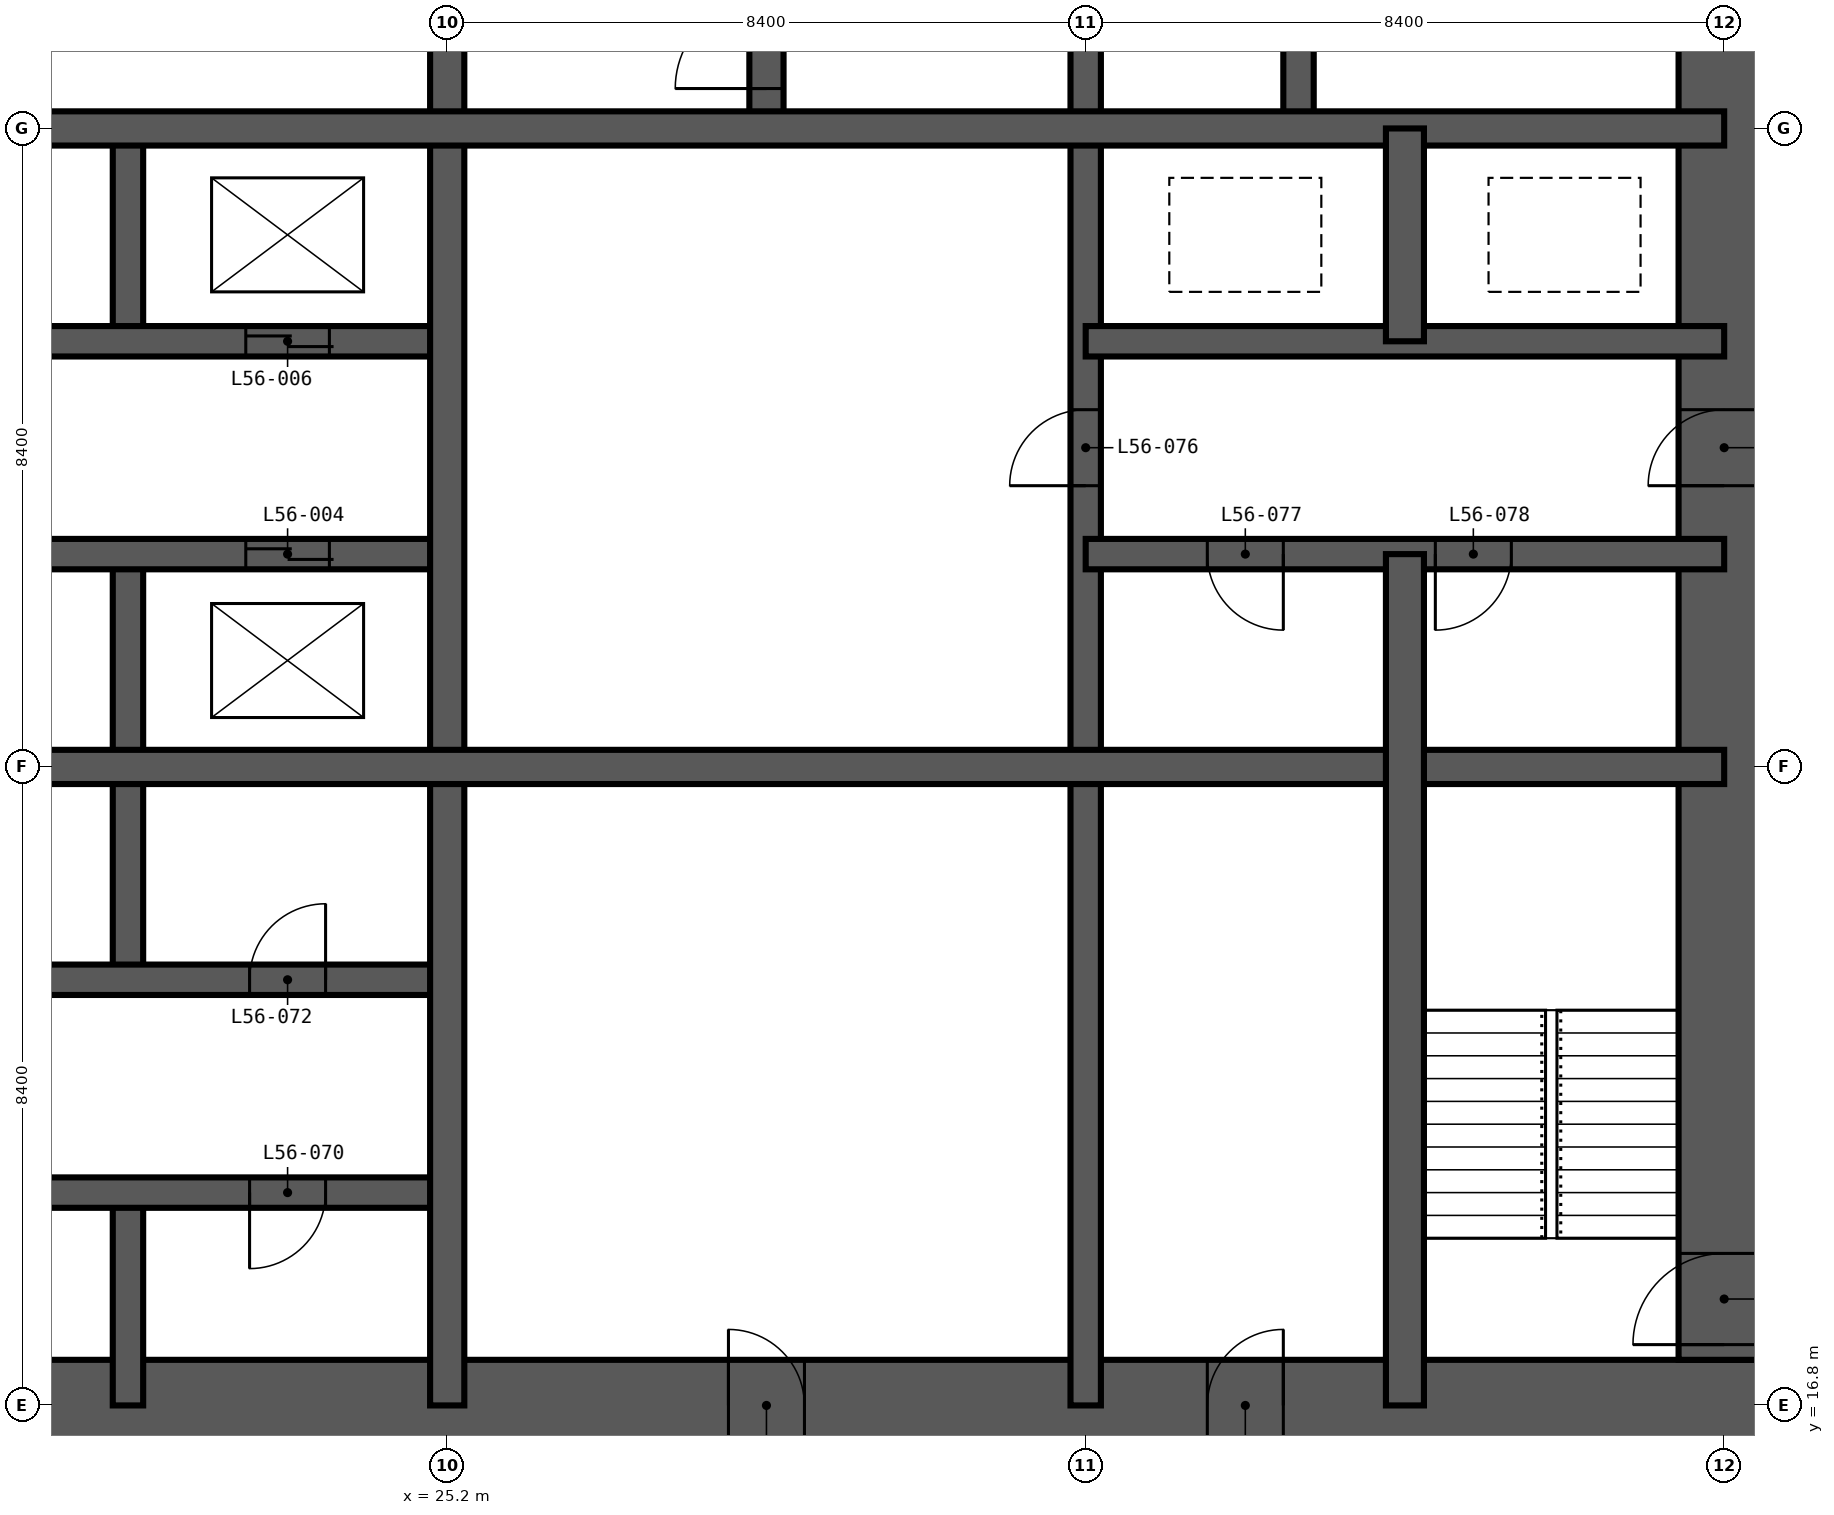
"""IFC4 building model, lengths in metres.
Left out: names, types, materials, properties, quantities, classifications, styles, units other than length and angle.
Written with IfcOpenShell. Run it as: python <this file> out.ifc"""

import sys

from ifc_helpers import new_model, si_unit, direction, frame, frame_2d, origin, place, context, subcontext, project, spatial, rectangle, extrude, element, fill, save


model = new_model("IFC4")
c1 = context("Model", 3, precision=1e-05, world=origin(), true_north=direction((0.0, 1.0)))
c2 = subcontext(c1, "Body", "Model", "MODEL_VIEW")
j1 = project(units=[si_unit("LENGTHUNIT", "METRE"), si_unit("PLANEANGLEUNIT", "RADIAN")], contexts=[c1])
p1 = place(None, origin())
s1 = spatial("IfcSite", under=j1, at=p1, CompositionType="ELEMENT")
p2 = place(p1, origin())
s2 = spatial("IfcBuilding", under=s1, at=p2, CompositionType="ELEMENT")
p3 = place(p2, frame((0.0, 0.0, 216.6)))
s3 = spatial("IfcBuildingStorey", under=s2, at=p3, CompositionType="ELEMENT", Elevation=216.6)
p4 = place(p3, frame((16.2, 16.8, -0.35), z_axis=(0.0, 0.0, 1.0), x_axis=(1.0, 0.0, 0.0)))
e1 = element("IfcWall", 1, at=p4, inside=s3, PredefinedType="SHEAR", context=c2, shape_type="SweptSolid", body=[
    extrude(rectangle(XDim=26.4, YDim=1.2, at=frame_2d((13.2, 0.0))), origin(), (0.0, 0.0, 1.0), 3.55),
])
p5 = place(p4, frame((12.7, 0.0, 0.35)))
e2 = element("IfcOpeningElement", 2, at=p5, cuts=e1, PredefinedType="OPENING", context=c2, shape_type="SweptSolid", body=[
    extrude(rectangle(XDim=1.0, YDim=2.1, at=frame_2d((0.5, 1.05))), frame((0.0, 0.61, 0.0), z_axis=(0.0, -1.0, 0.0), x_axis=(1.0, 0.0, 0.0)), (0.0, 0.0, 1.0), 1.22),
])
p6 = place(p4, frame((19.0, 0.0, 0.35)))
e3 = element("IfcOpeningElement", 3, at=p6, cuts=e1, PredefinedType="OPENING", context=c2, shape_type="SweptSolid", body=[
    extrude(rectangle(XDim=1.0, YDim=2.1, at=frame_2d((0.5, 1.05))), frame((0.0, 0.61, 0.0), z_axis=(0.0, -1.0, 0.0), x_axis=(1.0, 0.0, 0.0)), (0.0, 0.0, 1.0), 1.22),
])
p7 = place(p3, frame((42.0, 17.4, -0.35), z_axis=(0.0, 0.0, 1.0), x_axis=(0.0, 1.0, 0.0)))
e4 = element("IfcWall", 4, at=p7, inside=s3, PredefinedType="SHEAR", context=c2, shape_type="SweptSolid", body=[
    extrude(rectangle(XDim=24.0, YDim=1.2, at=frame_2d((12.0, 0.0))), origin(), (0.0, 0.0, 1.0), 3.55),
])
p8 = place(p7, frame((0.2, 0.0, 0.35)))
e5 = element("IfcOpeningElement", 5, at=p8, cuts=e4, PredefinedType="OPENING", context=c2, shape_type="SweptSolid", body=[
    extrude(rectangle(XDim=1.2, YDim=2.2, at=frame_2d((0.6, 1.1))), frame((0.0, 0.61, 0.0), z_axis=(0.0, -1.0, 0.0), x_axis=(1.0, 0.0, 0.0)), (0.0, 0.0, 1.0), 1.22),
])
p9 = place(p7, frame((11.5, 0.0, 0.35)))
e6 = element("IfcOpeningElement", 6, at=p9, cuts=e4, PredefinedType="OPENING", context=c2, shape_type="SweptSolid", body=[
    extrude(rectangle(XDim=1.0, YDim=2.1, at=frame_2d((0.5, 1.05))), frame((0.0, 0.61, 0.0), z_axis=(0.0, -1.0, 0.0), x_axis=(1.0, 0.0, 0.0)), (0.0, 0.0, 1.0), 1.22),
])
p10 = place(p7, frame((19.9, 0.0, 0.35)))
e7 = element("IfcOpeningElement", 7, at=p10, cuts=e4, PredefinedType="OPENING", context=c2, shape_type="SweptSolid", body=[
    extrude(rectangle(XDim=1.0, YDim=2.1, at=frame_2d((0.5, 1.05))), frame((0.0, 0.61, 0.0), z_axis=(0.0, -1.0, 0.0), x_axis=(1.0, 0.0, 0.0)), (0.0, 0.0, 1.0), 1.22),
])
p11 = place(p3, frame((21.0, 16.8, -0.35), z_axis=(0.0, 0.0, 1.0), x_axis=(0.0, 1.0, 0.0)))
e8 = element("IfcWall", 8, at=p11, inside=s3, PredefinedType="SHEAR", context=c2, shape_type="SweptSolid", body=[
    extrude(rectangle(XDim=2.8, YDim=0.4, at=frame_2d((1.4, 0.0))), origin(), (0.0, 0.0, 1.0), 3.55),
])
p12 = place(p3, frame((21.0, 22.4, -0.35), z_axis=(0.0, 0.0, 1.0), x_axis=(0.0, 1.0, 0.0)))
e9 = element("IfcWall", 9, at=p12, inside=s3, PredefinedType="SHEAR", context=c2, shape_type="SweptSolid", body=[
    extrude(rectangle(XDim=5.6, YDim=0.4, at=frame_2d((2.8, 0.0))), origin(), (0.0, 0.0, 1.0), 3.55),
])
p13 = place(p3, frame((21.0, 30.8, -0.35), z_axis=(0.0, 0.0, 1.0), x_axis=(0.0, 1.0, 0.0)))
e10 = element("IfcWall", 10, at=p13, inside=s3, PredefinedType="SHEAR", context=c2, shape_type="SweptSolid", body=[
    extrude(rectangle(XDim=2.8, YDim=0.4, at=frame_2d((1.4, 0.0))), origin(), (0.0, 0.0, 1.0), 3.55),
])
p14 = place(p3, frame((33.6, 16.8, -0.35), z_axis=(0.0, 0.0, 1.0), x_axis=(0.0, 1.0, 0.0)))
e11 = element("IfcWall", 11, at=p14, inside=s3, PredefinedType="SHEAR", context=c2, shape_type="SweptSolid", body=[
    extrude(rectangle(XDim=25.2, YDim=0.4, at=frame_2d((12.6, 0.0))), origin(), (0.0, 0.0, 1.0), 3.55),
])
p15 = place(p14, frame((22.5, 0.0, 0.35)))
e12 = element("IfcOpeningElement", 12, at=p15, cuts=e11, PredefinedType="OPENING", context=c2, shape_type="SweptSolid", body=[
    extrude(rectangle(XDim=1.2, YDim=2.2, at=frame_2d((0.6, 1.1))), frame((0.0, 0.21, 0.0), z_axis=(0.0, -1.0, 0.0), x_axis=(1.0, 0.0, 0.0)), (0.0, 0.0, 1.0), 0.42),
])
p16 = place(p14, frame((18.3, 0.0, 0.35)))
e13 = element("IfcOpeningElement", 13, at=p16, cuts=e11, PredefinedType="OPENING", context=c2, shape_type="SweptSolid", body=[
    extrude(rectangle(XDim=1.2, YDim=2.2, at=frame_2d((0.6, 1.1))), frame((0.0, 0.21, 0.0), z_axis=(0.0, -1.0, 0.0), x_axis=(1.0, 0.0, 0.0)), (0.0, 0.0, 1.0), 0.42),
])
p17 = place(p14, frame((12.1, 0.0, 0.35)))
e14 = element("IfcOpeningElement", 14, at=p17, cuts=e11, PredefinedType="OPENING", context=c2, shape_type="SweptSolid", body=[
    extrude(rectangle(XDim=1.0, YDim=2.1, at=frame_2d((0.5, 1.05))), frame((0.0, 0.21, 0.0), z_axis=(0.0, -1.0, 0.0), x_axis=(1.0, 0.0, 0.0)), (0.0, 0.0, 1.0), 0.42),
])
p18 = place(p3, frame((36.4, 33.6, -0.35), z_axis=(0.0, 0.0, 1.0), x_axis=(0.0, 1.0, 0.0)))
e15 = element("IfcWall", 15, at=p18, inside=s3, PredefinedType="SHEAR", context=c2, shape_type="SweptSolid", body=[
    extrude(rectangle(XDim=8.4, YDim=0.4, at=frame_2d((4.2, 0.0))), origin(), (0.0, 0.0, 1.0), 3.55),
])
p19 = place(p3, frame((16.8, 19.6, -0.35), z_axis=(0.0, 0.0, 1.0), x_axis=(1.0, 0.0, 0.0)))
e16 = element("IfcWall", 16, at=p19, inside=s3, PredefinedType="SHEAR", context=c2, shape_type="SweptSolid", body=[
    extrude(rectangle(XDim=8.4, YDim=0.4, at=frame_2d((4.2, 0.0))), origin(), (0.0, 0.0, 1.0), 3.55),
])
p20 = place(p19, frame((1.6, 0.0, 0.35)))
e17 = element("IfcOpeningElement", 17, at=p20, cuts=e16, PredefinedType="OPENING", context=c2, shape_type="SweptSolid", body=[
    extrude(rectangle(XDim=1.0, YDim=2.1, at=frame_2d((0.5, 1.05))), frame((0.0, 0.21, 0.0), z_axis=(0.0, -1.0, 0.0), x_axis=(1.0, 0.0, 0.0)), (0.0, 0.0, 1.0), 0.42),
])
p21 = place(p19, frame((5.8, 0.0, 0.35)))
e18 = element("IfcOpeningElement", 18, at=p21, cuts=e16, PredefinedType="OPENING", context=c2, shape_type="SweptSolid", body=[
    extrude(rectangle(XDim=1.0, YDim=2.1, at=frame_2d((0.5, 1.05))), frame((0.0, 0.21, 0.0), z_axis=(0.0, -1.0, 0.0), x_axis=(1.0, 0.0, 0.0)), (0.0, 0.0, 1.0), 0.42),
])
p22 = place(p3, frame((16.8, 22.4, -0.35), z_axis=(0.0, 0.0, 1.0), x_axis=(1.0, 0.0, 0.0)))
e19 = element("IfcWall", 19, at=p22, inside=s3, PredefinedType="SHEAR", context=c2, shape_type="SweptSolid", body=[
    extrude(rectangle(XDim=8.4, YDim=0.4, at=frame_2d((4.2, 0.0))), origin(), (0.0, 0.0, 1.0), 3.55),
])
p23 = place(p22, frame((1.6, 0.0, 0.35)))
e20 = element("IfcOpeningElement", 20, at=p23, cuts=e19, PredefinedType="OPENING", context=c2, shape_type="SweptSolid", body=[
    extrude(rectangle(XDim=1.0, YDim=2.1, at=frame_2d((0.5, 1.05))), frame((0.0, 0.21, 0.0), z_axis=(0.0, -1.0, 0.0), x_axis=(1.0, 0.0, 0.0)), (0.0, 0.0, 1.0), 0.42),
])
p24 = place(p22, frame((5.8, 0.0, 0.35)))
e21 = element("IfcOpeningElement", 21, at=p24, cuts=e19, PredefinedType="OPENING", context=c2, shape_type="SweptSolid", body=[
    extrude(rectangle(XDim=1.0, YDim=2.1, at=frame_2d((0.5, 1.05))), frame((0.0, 0.21, 0.0), z_axis=(0.0, -1.0, 0.0), x_axis=(1.0, 0.0, 0.0)), (0.0, 0.0, 1.0), 0.42),
])
p25 = place(p3, frame((16.8, 28.0, -0.35), z_axis=(0.0, 0.0, 1.0), x_axis=(1.0, 0.0, 0.0)))
e22 = element("IfcWall", 22, at=p25, inside=s3, PredefinedType="SHEAR", context=c2, shape_type="SweptSolid", body=[
    extrude(rectangle(XDim=8.4, YDim=0.4, at=frame_2d((4.2, 0.0))), origin(), (0.0, 0.0, 1.0), 3.55),
])
p26 = place(p25, frame((1.55, 0.0, 0.35)))
e23 = element("IfcOpeningElement", 23, at=p26, cuts=e22, PredefinedType="OPENING", context=c2, shape_type="SweptSolid", body=[
    extrude(rectangle(XDim=1.1, YDim=2.2, at=frame_2d((0.55, 1.1))), frame((0.0, 0.21, 0.0), z_axis=(0.0, -1.0, 0.0), x_axis=(1.0, 0.0, 0.0)), (0.0, 0.0, 1.0), 0.42),
])
p27 = place(p25, frame((5.75, 0.0, 0.35)))
e24 = element("IfcOpeningElement", 24, at=p27, cuts=e22, PredefinedType="OPENING", context=c2, shape_type="SweptSolid", body=[
    extrude(rectangle(XDim=1.1, YDim=2.2, at=frame_2d((0.55, 1.1))), frame((0.0, 0.21, 0.0), z_axis=(0.0, -1.0, 0.0), x_axis=(1.0, 0.0, 0.0)), (0.0, 0.0, 1.0), 0.42),
])
p28 = place(p3, frame((33.6, 28.0, -0.35), z_axis=(0.0, 0.0, 1.0), x_axis=(1.0, 0.0, 0.0)))
e25 = element("IfcWall", 25, at=p28, inside=s3, PredefinedType="SHEAR", context=c2, shape_type="SweptSolid", body=[
    extrude(rectangle(XDim=8.4, YDim=0.4, at=frame_2d((4.2, 0.0))), origin(), (0.0, 0.0, 1.0), 3.55),
])
p29 = place(p28, frame((1.6, 0.0, 0.35)))
e26 = element("IfcOpeningElement", 26, at=p29, cuts=e25, PredefinedType="OPENING", context=c2, shape_type="SweptSolid", body=[
    extrude(rectangle(XDim=1.0, YDim=2.1, at=frame_2d((0.5, 1.05))), frame((0.0, 0.21, 0.0), z_axis=(0.0, -1.0, 0.0), x_axis=(1.0, 0.0, 0.0)), (0.0, 0.0, 1.0), 0.42),
])
p30 = place(p28, frame((4.6, 0.0, 0.35)))
e27 = element("IfcOpeningElement", 27, at=p30, cuts=e25, PredefinedType="OPENING", context=c2, shape_type="SweptSolid", body=[
    extrude(rectangle(XDim=1.0, YDim=2.1, at=frame_2d((0.5, 1.05))), frame((0.0, 0.21, 0.0), z_axis=(0.0, -1.0, 0.0), x_axis=(1.0, 0.0, 0.0)), (0.0, 0.0, 1.0), 0.42),
])
p31 = place(p3, frame((16.8, 30.8, -0.35), z_axis=(0.0, 0.0, 1.0), x_axis=(1.0, 0.0, 0.0)))
e28 = element("IfcWall", 28, at=p31, inside=s3, PredefinedType="SHEAR", context=c2, shape_type="SweptSolid", body=[
    extrude(rectangle(XDim=8.4, YDim=0.4, at=frame_2d((4.2, 0.0))), origin(), (0.0, 0.0, 1.0), 3.55),
])
p32 = place(p31, frame((1.55, 0.0, 0.35)))
e29 = element("IfcOpeningElement", 29, at=p32, cuts=e28, PredefinedType="OPENING", context=c2, shape_type="SweptSolid", body=[
    extrude(rectangle(XDim=1.1, YDim=2.2, at=frame_2d((0.55, 1.1))), frame((0.0, 0.21, 0.0), z_axis=(0.0, -1.0, 0.0), x_axis=(1.0, 0.0, 0.0)), (0.0, 0.0, 1.0), 0.42),
])
p33 = place(p31, frame((5.75, 0.0, 0.35)))
e30 = element("IfcOpeningElement", 30, at=p33, cuts=e28, PredefinedType="OPENING", context=c2, shape_type="SweptSolid", body=[
    extrude(rectangle(XDim=1.1, YDim=2.2, at=frame_2d((0.55, 1.1))), frame((0.0, 0.21, 0.0), z_axis=(0.0, -1.0, 0.0), x_axis=(1.0, 0.0, 0.0)), (0.0, 0.0, 1.0), 0.42),
])
p34 = place(p3, frame((33.6, 30.8, -0.35), z_axis=(0.0, 0.0, 1.0), x_axis=(1.0, 0.0, 0.0)))
e31 = element("IfcWall", 31, at=p34, inside=s3, PredefinedType="SHEAR", context=c2, shape_type="SweptSolid", body=[
    extrude(rectangle(XDim=8.4, YDim=0.4, at=frame_2d((4.2, 0.0))), origin(), (0.0, 0.0, 1.0), 3.55),
])
p35 = place(p3, frame((25.2, 16.8, -0.35), z_axis=(0.0, 0.0, 1.0), x_axis=(0.0, 1.0, 0.0)))
e32 = element("IfcWall", 32, at=p35, inside=s3, PredefinedType="SHEAR", context=c2, shape_type="SweptSolid", body=[
    extrude(rectangle(XDim=25.2, YDim=0.45, at=frame_2d((12.6, 0.0))), origin(), (0.0, 0.0, 1.0), 3.55),
])
p36 = place(p3, frame((29.4, 33.6, -0.35), z_axis=(0.0, 0.0, 1.0), x_axis=(0.0, 1.0, 0.0)))
e33 = element("IfcWall", 33, at=p36, inside=s3, PredefinedType="SHEAR", context=c2, shape_type="SweptSolid", body=[
    extrude(rectangle(XDim=8.4, YDim=0.45, at=frame_2d((4.2, 0.0))), origin(), (0.0, 0.0, 1.0), 3.55),
])
p37 = place(p36, frame((0.525, 0.0, 0.35)))
e34 = element("IfcOpeningElement", 34, at=p37, cuts=e33, PredefinedType="OPENING", context=c2, shape_type="SweptSolid", body=[
    extrude(rectangle(XDim=1.2, YDim=2.2, at=frame_2d((0.6, 1.1))), frame((0.0, 0.235, 0.0), z_axis=(0.0, -1.0, 0.0), x_axis=(1.0, 0.0, 0.0)), (0.0, 0.0, 1.0), 0.47),
])
for number, where, z_axis, x_axis in (
    (35, (16.8, 25.2, -0.35), (0.0, 0.0, 1.0), (1.0, 0.0, 0.0)),
    (36, (16.8, 33.6, -0.35), (0.0, 0.0, 1.0), (1.0, 0.0, 0.0)),
):
    element("IfcWall", number, at=place(p3, frame(where, z_axis=z_axis, x_axis=x_axis)), inside=s3, PredefinedType="SHEAR", context=c2, shape_type="SweptSolid", body=[
        extrude(rectangle(XDim=25.2, YDim=0.45, at=frame_2d((12.6, 0.0))), origin(), (0.0, 0.0, 1.0), 3.55),
    ])
p38 = place(p3, frame((37.8, 16.8, -0.35), z_axis=(0.0, 0.0, 1.0), x_axis=(0.0, 1.0, 0.0)))
e37 = element("IfcWall", 37, at=p38, inside=s3, PredefinedType="SHEAR", context=c2, shape_type="SweptSolid", body=[
    extrude(rectangle(XDim=11.2, YDim=0.5, at=frame_2d((5.6, 0.0))), origin(), (0.0, 0.0, 1.0), 3.55),
])
p39 = place(p3, frame((37.8, 30.8, -0.35), z_axis=(0.0, 0.0, 1.0), x_axis=(0.0, 1.0, 0.0)))
e38 = element("IfcWall", 38, at=p39, inside=s3, PredefinedType="SHEAR", context=c2, shape_type="SweptSolid", body=[
    extrude(rectangle(XDim=2.8, YDim=0.5, at=frame_2d((1.4, 0.0))), origin(), (0.0, 0.0, 1.0), 3.55),
])
p40 = place(p37, origin())
e39 = element("IfcDoor", 39, at=p40, inside=s3, OperationType="SINGLE_SWING_LEFT", PredefinedType="DOOR", context=c2, shape_type="SweptSolid", body=[
    extrude(rectangle(XDim=1.2, YDim=2.2, at=frame_2d((0.6, 1.1))), frame((0.0, 0.025, 0.0), z_axis=(0.0, -1.0, 0.0), x_axis=(1.0, 0.0, 0.0)), (0.0, 0.0, 1.0), 0.05),
])
fill(e34, e39)
p41 = place(p8, origin())
e40 = element("IfcDoor", 40, at=p41, inside=s3, OperationType="SINGLE_SWING_LEFT", PredefinedType="DOOR", context=c2, shape_type="SweptSolid", body=[
    extrude(rectangle(XDim=1.2, YDim=2.2, at=frame_2d((0.6, 1.1))), frame((0.0, 0.025, 0.0), z_axis=(0.0, -1.0, 0.0), x_axis=(1.0, 0.0, 0.0)), (0.0, 0.0, 1.0), 0.05),
])
fill(e5, e40)
p42 = place(p27, origin())
e41 = element("IfcDoor", 41, at=p42, inside=s3, OperationType="DOUBLE_DOOR_SLIDING", PredefinedType="DOOR", context=c2, shape_type="SweptSolid", body=[
    extrude(rectangle(XDim=1.1, YDim=2.2, at=frame_2d((0.55, 1.1))), frame((0.0, 0.025, 0.0), z_axis=(0.0, -1.0, 0.0), x_axis=(1.0, 0.0, 0.0)), (0.0, 0.0, 1.0), 0.05),
])
fill(e24, e41)
p43 = place(p33, origin())
e42 = element("IfcDoor", 42, at=p43, inside=s3, OperationType="DOUBLE_DOOR_SLIDING", PredefinedType="DOOR", context=c2, shape_type="SweptSolid", body=[
    extrude(rectangle(XDim=1.1, YDim=2.2, at=frame_2d((0.55, 1.1))), frame((0.0, 0.025, 0.0), z_axis=(0.0, -1.0, 0.0), x_axis=(1.0, 0.0, 0.0)), (0.0, 0.0, 1.0), 0.05),
])
fill(e30, e42)
p44 = place(p21, frame((1.0, 0.0, 0.0), z_axis=(0.0, 0.0, 1.0), x_axis=(-1.0, 0.0, 0.0)))
e43 = element("IfcDoor", 43, at=p44, inside=s3, OperationType="SINGLE_SWING_RIGHT", PredefinedType="DOOR", context=c2, shape_type="SweptSolid", body=[
    extrude(rectangle(XDim=1.0, YDim=2.1, at=frame_2d((0.5, 1.05))), frame((0.0, 0.025, 0.0), z_axis=(0.0, -1.0, 0.0), x_axis=(1.0, 0.0, 0.0)), (0.0, 0.0, 1.0), 0.05),
])
fill(e18, e43)
p45 = place(p24, origin())
e44 = element("IfcDoor", 44, at=p45, inside=s3, OperationType="SINGLE_SWING_RIGHT", PredefinedType="DOOR", context=c2, shape_type="SweptSolid", body=[
    extrude(rectangle(XDim=1.0, YDim=2.1, at=frame_2d((0.5, 1.05))), frame((0.0, 0.025, 0.0), z_axis=(0.0, -1.0, 0.0), x_axis=(1.0, 0.0, 0.0)), (0.0, 0.0, 1.0), 0.05),
])
fill(e21, e44)
p46 = place(p17, origin())
e45 = element("IfcDoor", 45, at=p46, inside=s3, OperationType="SINGLE_SWING_LEFT", PredefinedType="DOOR", context=c2, shape_type="SweptSolid", body=[
    extrude(rectangle(XDim=1.0, YDim=2.1, at=frame_2d((0.5, 1.05))), frame((0.0, 0.025, 0.0), z_axis=(0.0, -1.0, 0.0), x_axis=(1.0, 0.0, 0.0)), (0.0, 0.0, 1.0), 0.05),
])
fill(e14, e45)
p47 = place(p29, frame((1.0, 0.0, 0.0), z_axis=(0.0, 0.0, 1.0), x_axis=(-1.0, 0.0, 0.0)))
e46 = element("IfcDoor", 46, at=p47, inside=s3, OperationType="SINGLE_SWING_LEFT", PredefinedType="DOOR", context=c2, shape_type="SweptSolid", body=[
    extrude(rectangle(XDim=1.0, YDim=2.1, at=frame_2d((0.5, 1.05))), frame((0.0, 0.025, 0.0), z_axis=(0.0, -1.0, 0.0), x_axis=(1.0, 0.0, 0.0)), (0.0, 0.0, 1.0), 0.05),
])
fill(e26, e46)
p48 = place(p30, frame((1.0, 0.0, 0.0), z_axis=(0.0, 0.0, 1.0), x_axis=(-1.0, 0.0, 0.0)))
e47 = element("IfcDoor", 47, at=p48, inside=s3, OperationType="SINGLE_SWING_RIGHT", PredefinedType="DOOR", context=c2, shape_type="SweptSolid", body=[
    extrude(rectangle(XDim=1.0, YDim=2.1, at=frame_2d((0.5, 1.05))), frame((0.0, 0.025, 0.0), z_axis=(0.0, -1.0, 0.0), x_axis=(1.0, 0.0, 0.0)), (0.0, 0.0, 1.0), 0.05),
])
fill(e27, e47)
p49 = place(p9, origin())
e48 = element("IfcDoor", 48, at=p49, inside=s3, OperationType="SINGLE_SWING_LEFT", PredefinedType="DOOR", context=c2, shape_type="SweptSolid", body=[
    extrude(rectangle(XDim=1.0, YDim=2.1, at=frame_2d((0.5, 1.05))), frame((0.0, 0.025, 0.0), z_axis=(0.0, -1.0, 0.0), x_axis=(1.0, 0.0, 0.0)), (0.0, 0.0, 1.0), 0.05),
])
fill(e6, e48)
p50 = place(p5, origin())
e49 = element("IfcDoor", 49, at=p50, inside=s3, OperationType="SINGLE_SWING_LEFT", PredefinedType="DOOR", context=c2, shape_type="SweptSolid", body=[
    extrude(rectangle(XDim=1.0, YDim=2.1, at=frame_2d((0.5, 1.05))), frame((0.0, 0.025, 0.0), z_axis=(0.0, -1.0, 0.0), x_axis=(1.0, 0.0, 0.0)), (0.0, 0.0, 1.0), 0.05),
])
fill(e2, e49)
p51 = place(p6, origin())
e50 = element("IfcDoor", 50, at=p51, inside=s3, OperationType="SINGLE_SWING_RIGHT", PredefinedType="DOOR", context=c2, shape_type="SweptSolid", body=[
    extrude(rectangle(XDim=1.0, YDim=2.1, at=frame_2d((0.5, 1.05))), frame((0.0, 0.025, 0.0), z_axis=(0.0, -1.0, 0.0), x_axis=(1.0, 0.0, 0.0)), (0.0, 0.0, 1.0), 0.05),
])
fill(e3, e50)
save(model, sys.argv[1])
